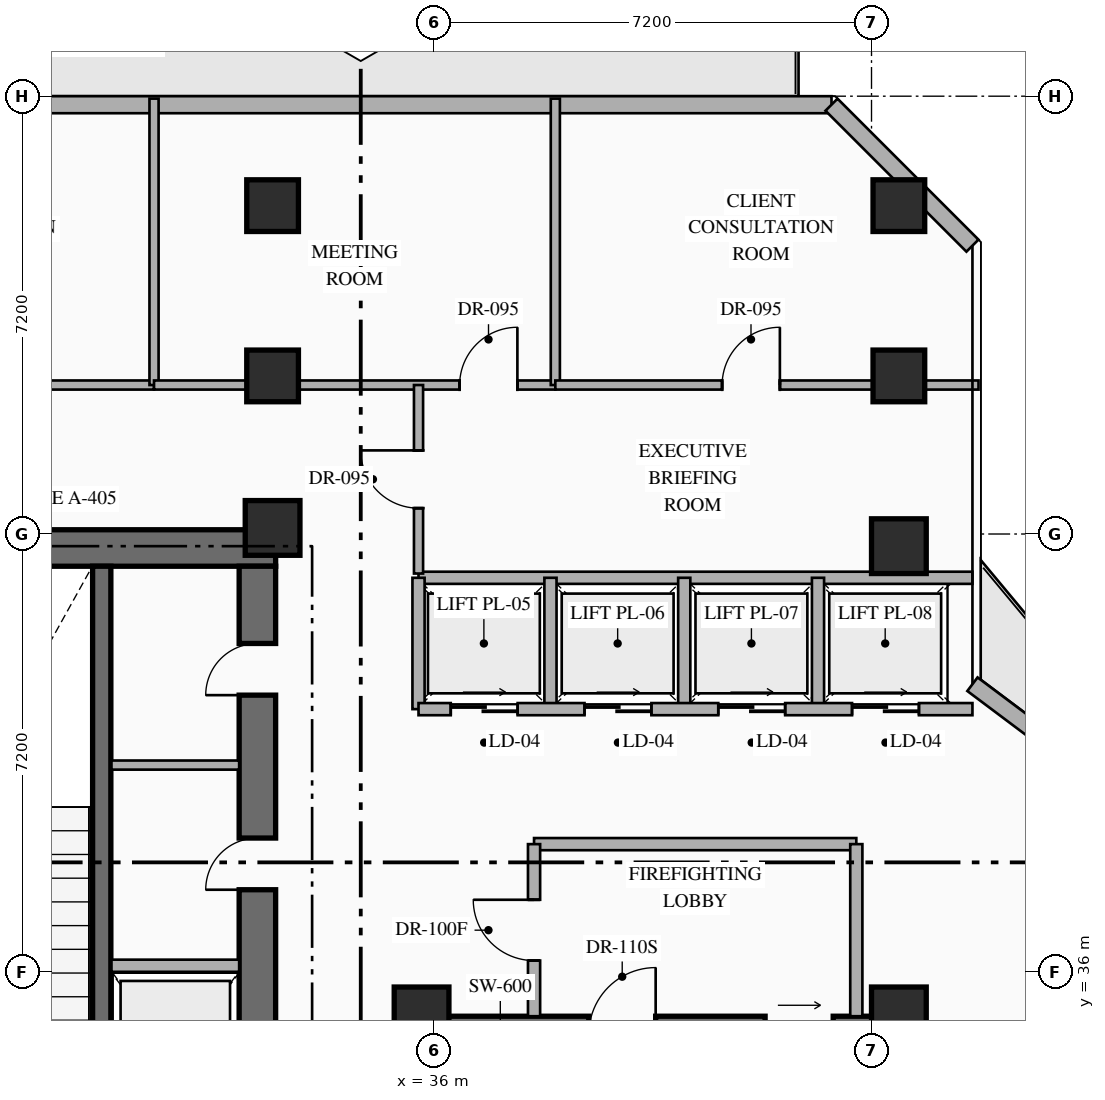
"""IFC4 building model, lengths in metres.
Left out: names, types, materials, properties, quantities, classifications, styles, units other than length and angle.
Written with IfcOpenShell. Run it as: python <this file> out.ifc"""

import sys

from ifc_helpers import new_model, si_unit, direction, frame, frame_2d, origin, origin_2d, place, context, subcontext, project, spatial, rectangle, hollow_rectangle, extrude, element, fill, save


model = new_model("IFC4")
c1 = context("Model", 3, precision=1e-05, world=origin(), true_north=direction((0.0, 1.0)))
c2 = subcontext(c1, "Body", "Model", "MODEL_VIEW")
j1 = project(units=[si_unit("LENGTHUNIT", "METRE"), si_unit("PLANEANGLEUNIT", "RADIAN")], contexts=[c1])
p1 = place(None, origin())
s1 = spatial("IfcSite", under=j1, at=p1, CompositionType="ELEMENT")
p2 = place(p1, origin())
s2 = spatial("IfcBuilding", under=s1, at=p2, CompositionType="ELEMENT")
p3 = place(p2, frame((0.0, 0.0, 145.65)))
s3 = spatial("IfcBuildingStorey", under=s2, at=p3, CompositionType="ELEMENT", Elevation=145.65)
p4 = place(p3, frame((25.62, 42.97, 0.0), z_axis=(0.0, 0.0, 1.0), x_axis=(1.0, 0.0, 0.0)))
e1 = element("IfcWall", 1, at=p4, inside=s3, PredefinedType="SHEAR", context=c2, shape_type="SweptSolid", body=[
    extrude(rectangle(XDim=7.78, YDim=0.6, at=frame_2d((3.89, 0.0))), origin(), (0.0, 0.0, 1.0), 3.6),
])
p5 = place(p3, frame((33.1, 33.19, 0.0), z_axis=(0.0, 0.0, 1.0), x_axis=(0.0, 1.0, 0.0)))
e2 = element("IfcWall", 2, at=p5, inside=s3, PredefinedType="SHEAR", context=c2, shape_type="SweptSolid", body=[
    extrude(rectangle(XDim=9.48, YDim=0.6, at=frame_2d((4.74, 0.0))), origin(), (0.0, 0.0, 1.0), 3.6),
])
p6 = place(p5, frame((4.16, 0.0, 0.0)))
e3 = element("IfcOpeningElement", 3, at=p6, cuts=e2, PredefinedType="OPENING", context=c2, shape_type="SweptSolid", body=[
    extrude(rectangle(XDim=0.85, YDim=2.08, at=frame_2d((0.425, 1.04))), frame((0.0, 0.31, 0.0), z_axis=(0.0, -1.0, 0.0), x_axis=(1.0, 0.0, 0.0)), (0.0, 0.0, 1.0), 0.62),
])
p7 = place(p5, frame((7.36, 0.0, 0.0)))
e4 = element("IfcOpeningElement", 4, at=p7, cuts=e2, PredefinedType="OPENING", context=c2, shape_type="SweptSolid", body=[
    extrude(rectangle(XDim=0.85, YDim=2.08, at=frame_2d((0.425, 1.04))), frame((0.0, 0.31, 0.0), z_axis=(0.0, -1.0, 0.0), x_axis=(1.0, 0.0, 0.0)), (0.0, 0.0, 1.0), 0.62),
])
p8 = place(p3, frame((30.54, 33.19, 0.0), z_axis=(0.0, 0.0, 1.0), x_axis=(0.0, 1.0, 0.0)))
e5 = element("IfcWall", 5, at=p8, inside=s3, PredefinedType="SHEAR", context=c2, shape_type="SweptSolid", body=[
    extrude(rectangle(XDim=9.48, YDim=0.3, at=frame_2d((4.74, 0.0))), origin(), (0.0, 0.0, 1.0), 3.6),
])
p9 = place(p3, frame((35.89, 34.97, 0.0), z_axis=(0.0, 0.0, 1.0), x_axis=(1.0, 0.0, 0.0)))
e6 = element("IfcWall", 6, at=p9, inside=s3, PredefinedType="SHEAR", context=c2, shape_type="SweptSolid", body=[
    extrude(rectangle(XDim=7.76, YDim=0.6, at=frame_2d((3.88, 0.0))), origin(), (0.0, 0.0, 1.0), 3.6),
])
p10 = place(p9, frame((2.66, 0.0, 0.0)))
e7 = element("IfcOpeningElement", 7, at=p10, cuts=e6, PredefinedType="OPENING", context=c2, shape_type="SweptSolid", body=[
    extrude(rectangle(XDim=1.1, YDim=2.2, at=frame_2d((0.55, 1.1))), frame((0.0, 0.31, 0.0), z_axis=(0.0, -1.0, 0.0), x_axis=(1.0, 0.0, 0.0)), (0.0, 0.0, 1.0), 0.62),
])
p11 = place(p9, frame((5.56, 0.0, 0.0)))
e8 = element("IfcOpeningElement", 8, at=p11, cuts=e6, PredefinedType="OPENING", context=c2, shape_type="SweptSolid", body=[
    extrude(rectangle(XDim=1.12, YDim=2.15, at=frame_2d((0.56, 1.075))), frame((0.0, 0.31, 0.0), z_axis=(0.0, -1.0, 0.0), x_axis=(1.0, 0.0, 0.0)), (0.0, 0.0, 1.0), 0.62),
])
for number, where, z_axis, x_axis in (
    (9, (33.35, 43.3, 0.0), (0.0, 0.0, 1.0), (1.0, 0.0, 0.0)),
    (10, (35.8, 35.3, 0.0), (0.0, 0.0, 1.0), (1.0, 0.0, 0.0)),
    (11, (43.65, 35.3, 0.0), (0.0, 0.0, 1.0), (1.0, 0.0, 0.0)),
    (12, (43.65, 43.0, 0.0), (0.0, 0.0, 1.0), (1.0, 0.0, 0.0)),
):
    element("IfcColumn", number, at=place(p3, frame(where, z_axis=z_axis, x_axis=x_axis)), inside=s3, PredefinedType="COLUMN", context=c2, shape_type="SweptSolid", body=[
        extrude(rectangle(XDim=0.9, YDim=0.9, at=origin_2d()), origin(), (0.0, 0.0, 1.0), 3.6),
    ])
for number, where, z_axis, x_axis in (
    (13, (33.35, 45.8, 0.0), (0.0, 0.0, 1.0), (1.0, 0.0, 0.0)),
    (14, (43.65, 45.8, 0.0), (0.0, 0.0, 1.0), (1.0, 0.0, 0.0)),
    (15, (33.35, 48.6, 0.0), (0.0, 0.0, 1.0), (1.0, 0.0, 0.0)),
    (16, (43.65, 48.6, 0.0), (0.0, 0.0, 1.0), (1.0, 0.0, 0.0)),
):
    element("IfcColumn", number, at=place(p3, frame(where, z_axis=z_axis, x_axis=x_axis)), inside=s3, PredefinedType="COLUMN", context=c2, shape_type="SweptSolid", body=[
        extrude(hollow_rectangle(XDim=0.85, YDim=0.85, WallThickness=0.032, at=origin_2d()), origin(), (0.0, 0.0, 1.0), 3.6),
    ])
p12 = place(p3, frame((44.86, 40.73, 0.0), z_axis=(0.0, 0.0, 1.0), x_axis=(0.800007624502, -0.599989833863, 0.0)))
e17 = element("IfcWall", 17, at=p12, inside=s3, PredefinedType="STANDARD", context=c2, shape_type="SweptSolid", body=[
    extrude(rectangle(XDim=19.212, YDim=0.28, at=frame_2d((9.606, 0.0))), origin(), (0.0, 0.0, 1.0), 3.35),
])
p13 = place(p12, frame((1.755, 0.0, 0.0)))
e18 = element("IfcOpeningElement", 18, at=p13, cuts=e17, PredefinedType="OPENING", context=c2, shape_type="SweptSolid", body=[
    extrude(rectangle(XDim=1.1, YDim=2.2, at=frame_2d((0.55, 1.1))), frame((0.0, 0.15, 0.0), z_axis=(0.0, -1.0, 0.0), x_axis=(1.0, 0.0, 0.0)), (0.0, 0.0, 1.0), 0.3),
])
p14 = place(p12, frame((13.509, 0.0, 0.85)))
e19 = element("IfcOpeningElement", 19, at=p14, cuts=e17, PredefinedType="OPENING", context=c2, shape_type="SweptSolid", body=[
    extrude(rectangle(XDim=1.8, YDim=2.1, at=frame_2d((0.9, 1.05))), frame((0.0, 0.15, 0.0), z_axis=(0.0, -1.0, 0.0), x_axis=(1.0, 0.0, 0.0)), (0.0, 0.0, 1.0), 0.3),
])
p15 = place(p3, frame((12.058, 50.26, 0.0), z_axis=(0.0, 0.0, 1.0), x_axis=(1.0, 0.0, 0.0)))
e20 = element("IfcWall", 20, at=p15, inside=s3, PredefinedType="STANDARD", context=c2, shape_type="SweptSolid", body=[
    extrude(rectangle(XDim=30.484, YDim=0.28, at=frame_2d((15.242, 0.0))), origin(), (0.0, 0.0, 1.0), 3.35),
])
p16 = place(p15, frame((14.992, 0.0, 0.0)))
e21 = element("IfcOpeningElement", 21, at=p16, cuts=e20, PredefinedType="OPENING", context=c2, shape_type="SweptSolid", body=[
    extrude(rectangle(XDim=1.1, YDim=2.2, at=frame_2d((0.55, 1.1))), frame((0.0, 0.15, 0.0), z_axis=(0.0, -1.0, 0.0), x_axis=(1.0, 0.0, 0.0)), (0.0, 0.0, 1.0), 0.3),
])
p17 = place(p15, frame((10.074, 0.0, 0.85)))
e22 = element("IfcOpeningElement", 22, at=p17, cuts=e20, PredefinedType="OPENING", context=c2, shape_type="SweptSolid", body=[
    extrude(rectangle(XDim=1.8, YDim=2.1, at=frame_2d((0.9, 1.05))), frame((0.0, 0.15, 0.0), z_axis=(0.0, -1.0, 0.0), x_axis=(1.0, 0.0, 0.0)), (0.0, 0.0, 1.0), 0.3),
])
p18 = place(p3, frame((42.542, 50.26, 0.0), z_axis=(0.0, 0.0, 1.0), x_axis=(0.707106781187, -0.707106781187, 0.0)))
e23 = element("IfcWall", 23, at=p18, inside=s3, PredefinedType="STANDARD", context=c2, shape_type="SweptSolid", body=[
    extrude(rectangle(XDim=3.278, YDim=0.28, at=frame_2d((1.639, 0.0))), origin(), (0.0, 0.0, 1.0), 3.35),
])
p19 = place(p3, frame((30.7, 36.1, 0.0), z_axis=(0.0, 0.0, 1.0), x_axis=(1.0, 0.0, 0.0)))
e24 = element("IfcWall", 24, at=p19, inside=s3, PredefinedType="STANDARD", context=c2, shape_type="SweptSolid", body=[
    extrude(rectangle(XDim=2.1, YDim=0.2, at=frame_2d((1.05, 0.0))), origin(), (0.0, 0.0, 1.0), 3.35),
])
p20 = place(p3, frame((30.7, 39.4, 0.0), z_axis=(0.0, 0.0, 1.0), x_axis=(1.0, 0.0, 0.0)))
e25 = element("IfcWall", 25, at=p20, inside=s3, PredefinedType="PARTITIONING", context=c2, shape_type="SweptSolid", body=[
    extrude(rectangle(XDim=2.1, YDim=0.15, at=frame_2d((1.05, 0.0))), origin(), (0.0, 0.0, 1.0), 3.35),
])
p21 = place(p3, frame((37.65, 38.1, 0.0), z_axis=(0.0, 0.0, 1.0), x_axis=(1.0, 0.0, 0.0)))
e26 = element("IfcWall", 26, at=p21, inside=s3, PredefinedType="STANDARD", context=c2, shape_type="SweptSolid", body=[
    extrude(rectangle(XDim=5.3, YDim=0.2, at=frame_2d((2.65, 0.0))), origin(), (0.0, 0.0, 1.0), 3.35),
])
p22 = place(p3, frame((42.95, 35.27, 0.0), z_axis=(0.0, 0.0, 1.0), x_axis=(0.0, 1.0, 0.0)))
e27 = element("IfcWall", 27, at=p22, inside=s3, PredefinedType="STANDARD", context=c2, shape_type="SweptSolid", body=[
    extrude(rectangle(XDim=2.83, YDim=0.2, at=frame_2d((1.415, 0.0))), origin(), (0.0, 0.0, 1.0), 3.35),
])
p23 = place(p3, frame((37.65, 35.27, 0.0), z_axis=(0.0, 0.0, 1.0), x_axis=(0.0, 1.0, 0.0)))
e28 = element("IfcWall", 28, at=p23, inside=s3, PredefinedType="STANDARD", context=c2, shape_type="SweptSolid", body=[
    extrude(rectangle(XDim=2.83, YDim=0.2, at=frame_2d((1.415, 0.0))), origin(), (0.0, 0.0, 1.0), 3.35),
])
p24 = place(p23, frame((0.915, 0.0, 0.0)))
e29 = element("IfcOpeningElement", 29, at=p24, cuts=e28, PredefinedType="OPENING", context=c2, shape_type="SweptSolid", body=[
    extrude(rectangle(XDim=1.0, YDim=2.2, at=frame_2d((0.5, 1.1))), frame((0.0, 0.11, 0.0), z_axis=(0.0, -1.0, 0.0), x_axis=(1.0, 0.0, 0.0)), (0.0, 0.0, 1.0), 0.22),
])
p25 = place(p3, frame((35.75, 42.48, 0.0), z_axis=(0.0, 0.0, 1.0), x_axis=(1.0, 0.0, 0.0)))
e30 = element("IfcWall", 30, at=p25, inside=s3, PredefinedType="STANDARD", context=c2, shape_type="SweptSolid", body=[
    extrude(rectangle(XDim=9.11, YDim=0.2, at=frame_2d((4.555, 0.0))), origin(), (0.0, 0.0, 1.0), 3.35),
])
for number, where, z_axis, x_axis in (
    (31, (35.75, 40.32, 0.0), (0.0, 0.0, 1.0), (0.0, 1.0, 0.0)),
    (32, (37.92, 40.32, 0.0), (0.0, 0.0, 1.0), (0.0, 1.0, 0.0)),
    (33, (40.12, 40.32, 0.0), (0.0, 0.0, 1.0), (0.0, 1.0, 0.0)),
    (34, (42.32, 40.32, 0.0), (0.0, 0.0, 1.0), (0.0, 1.0, 0.0)),
):
    element("IfcWall", number, at=place(p3, frame(where, z_axis=z_axis, x_axis=x_axis)), inside=s3, PredefinedType="STANDARD", context=c2, shape_type="SweptSolid", body=[
        extrude(rectangle(XDim=2.16, YDim=0.2, at=frame_2d((1.08, 0.0))), origin(), (0.0, 0.0, 1.0), 3.35),
    ])
p26 = place(p3, frame((35.75, 40.32, 0.0), z_axis=(0.0, 0.0, 1.0), x_axis=(1.0, 0.0, 0.0)))
e35 = element("IfcWall", 35, at=p26, inside=s3, PredefinedType="STANDARD", context=c2, shape_type="SweptSolid", body=[
    extrude(rectangle(XDim=9.11, YDim=0.2, at=frame_2d((4.555, 0.0))), origin(), (0.0, 0.0, 1.0), 3.35),
])
p27 = place(p26, frame((0.53, 0.0, 0.0)))
e36 = element("IfcOpeningElement", 36, at=p27, cuts=e35, PredefinedType="OPENING", context=c2, shape_type="SweptSolid", body=[
    extrude(rectangle(XDim=1.1, YDim=2.18, at=frame_2d((0.55, 1.09))), frame((0.0, 0.11, 0.0), z_axis=(0.0, -1.0, 0.0), x_axis=(1.0, 0.0, 0.0)), (0.0, 0.0, 1.0), 0.22),
])
p28 = place(p26, frame((2.73, 0.0, 0.0)))
e37 = element("IfcOpeningElement", 37, at=p28, cuts=e35, PredefinedType="OPENING", context=c2, shape_type="SweptSolid", body=[
    extrude(rectangle(XDim=1.1, YDim=2.18, at=frame_2d((0.55, 1.09))), frame((0.0, 0.11, 0.0), z_axis=(0.0, -1.0, 0.0), x_axis=(1.0, 0.0, 0.0)), (0.0, 0.0, 1.0), 0.22),
])
p29 = place(p26, frame((4.93, 0.0, 0.0)))
e38 = element("IfcOpeningElement", 38, at=p29, cuts=e35, PredefinedType="OPENING", context=c2, shape_type="SweptSolid", body=[
    extrude(rectangle(XDim=1.1, YDim=2.18, at=frame_2d((0.55, 1.09))), frame((0.0, 0.11, 0.0), z_axis=(0.0, -1.0, 0.0), x_axis=(1.0, 0.0, 0.0)), (0.0, 0.0, 1.0), 0.22),
])
p30 = place(p26, frame((7.13, 0.0, 0.0)))
e39 = element("IfcOpeningElement", 39, at=p30, cuts=e35, PredefinedType="OPENING", context=c2, shape_type="SweptSolid", body=[
    extrude(rectangle(XDim=1.1, YDim=2.18, at=frame_2d((0.55, 1.09))), frame((0.0, 0.11, 0.0), z_axis=(0.0, -1.0, 0.0), x_axis=(1.0, 0.0, 0.0)), (0.0, 0.0, 1.0), 0.22),
])
p31 = place(p3, frame((25.8, 45.65, 0.0), z_axis=(0.0, 0.0, 1.0), x_axis=(1.0, 0.0, 0.0)))
e40 = element("IfcWall", 40, at=p31, inside=s3, PredefinedType="PARTITIONING", context=c2, shape_type="SweptSolid", body=[
    extrude(rectangle(XDim=5.6, YDim=0.15, at=frame_2d((2.8, 0.0))), origin(), (0.0, 0.0, 1.0), 2.695),
])
p32 = place(p31, frame((2.325, 0.0, 0.0)))
e41 = element("IfcOpeningElement", 41, at=p32, cuts=e40, PredefinedType="OPENING", context=c2, shape_type="SweptSolid", body=[
    extrude(rectangle(XDim=0.95, YDim=2.15, at=frame_2d((0.475, 1.075))), frame((0.0, 0.085, 0.0), z_axis=(0.0, -1.0, 0.0), x_axis=(1.0, 0.0, 0.0)), (0.0, 0.0, 1.0), 0.17),
])
p33 = place(p3, frame((31.4, 45.65, 0.0), z_axis=(0.0, 0.0, 1.0), x_axis=(0.0, 1.0, 0.0)))
e42 = element("IfcWall", 42, at=p33, inside=s3, PredefinedType="PARTITIONING", context=c2, shape_type="SweptSolid", body=[
    extrude(rectangle(XDim=4.71, YDim=0.15, at=frame_2d((2.355, 0.0))), origin(), (0.0, 0.0, 1.0), 3.35),
])
p34 = place(p3, frame((31.4, 45.65, 0.0), z_axis=(0.0, 0.0, 1.0), x_axis=(1.0, 0.0, 0.0)))
e43 = element("IfcWall", 43, at=p34, inside=s3, PredefinedType="PARTITIONING", context=c2, shape_type="SweptSolid", body=[
    extrude(rectangle(XDim=6.6, YDim=0.15, at=frame_2d((3.3, 0.0))), origin(), (0.0, 0.0, 1.0), 2.695),
])
p35 = place(p34, frame((5.026, 0.0, 0.0)))
e44 = element("IfcOpeningElement", 44, at=p35, cuts=e43, PredefinedType="OPENING", context=c2, shape_type="SweptSolid", body=[
    extrude(rectangle(XDim=0.95, YDim=2.15, at=frame_2d((0.475, 1.075))), frame((0.0, 0.085, 0.0), z_axis=(0.0, -1.0, 0.0), x_axis=(1.0, 0.0, 0.0)), (0.0, 0.0, 1.0), 0.17),
])
p36 = place(p3, frame((38.0, 45.65, 0.0), z_axis=(0.0, 0.0, 1.0), x_axis=(0.0, 1.0, 0.0)))
e45 = element("IfcWall", 45, at=p36, inside=s3, PredefinedType="PARTITIONING", context=c2, shape_type="SweptSolid", body=[
    extrude(rectangle(XDim=4.71, YDim=0.15, at=frame_2d((2.355, 0.0))), origin(), (0.0, 0.0, 1.0), 3.35),
])
p37 = place(p3, frame((38.0, 45.65, 0.0), z_axis=(0.0, 0.0, 1.0), x_axis=(1.0, 0.0, 0.0)))
e46 = element("IfcWall", 46, at=p37, inside=s3, PredefinedType="PARTITIONING", context=c2, shape_type="SweptSolid", body=[
    extrude(rectangle(XDim=6.96, YDim=0.15, at=frame_2d((3.48, 0.0))), origin(), (0.0, 0.0, 1.0), 2.695),
])
p38 = place(p37, frame((2.743, 0.0, 0.0)))
e47 = element("IfcOpeningElement", 47, at=p38, cuts=e46, PredefinedType="OPENING", context=c2, shape_type="SweptSolid", body=[
    extrude(rectangle(XDim=0.95, YDim=2.15, at=frame_2d((0.475, 1.075))), frame((0.0, 0.085, 0.0), z_axis=(0.0, -1.0, 0.0), x_axis=(1.0, 0.0, 0.0)), (0.0, 0.0, 1.0), 0.17),
])
p39 = place(p3, frame((43.63, 31.973, 0.0), z_axis=(0.0, 0.0, 1.0), x_axis=(0.599975099311, 0.800018674911, 0.0)))
e48 = element("IfcWall", 48, at=p39, inside=s3, PredefinedType="PARTITIONING", context=c2, shape_type="SweptSolid", body=[
    extrude(rectangle(XDim=7.844, YDim=0.15, at=frame_2d((3.922, 0.0))), origin(), (0.0, 0.0, 1.0), 3.35),
])
p40 = place(p3, frame((35.75, 42.55, 0.0), z_axis=(0.0, 0.0, 1.0), x_axis=(0.0, 1.0, 0.0)))
e49 = element("IfcWall", 49, at=p40, inside=s3, PredefinedType="PARTITIONING", context=c2, shape_type="SweptSolid", body=[
    extrude(rectangle(XDim=3.1, YDim=0.15, at=frame_2d((1.55, 0.0))), origin(), (0.0, 0.0, 1.0), 3.35),
])
p41 = place(p40, frame((1.075, 0.0, 0.0)))
e50 = element("IfcOpeningElement", 50, at=p41, cuts=e49, PredefinedType="OPENING", context=c2, shape_type="SweptSolid", body=[
    extrude(rectangle(XDim=0.95, YDim=2.15, at=frame_2d((0.475, 1.075))), frame((0.0, 0.085, 0.0), z_axis=(0.0, -1.0, 0.0), x_axis=(1.0, 0.0, 0.0)), (0.0, 0.0, 1.0), 0.17),
])
p42 = place(p6, origin())
e51 = element("IfcDoor", 51, at=p42, inside=s3, OperationType="SINGLE_SWING_LEFT", PredefinedType="DOOR", context=c2, shape_type="SweptSolid", body=[
    extrude(rectangle(XDim=0.85, YDim=2.08, at=frame_2d((0.425, 1.04))), frame((0.0, 0.025, 0.0), z_axis=(0.0, -1.0, 0.0), x_axis=(1.0, 0.0, 0.0)), (0.0, 0.0, 1.0), 0.05),
])
fill(e3, e51)
p43 = place(p7, origin())
e52 = element("IfcDoor", 52, at=p43, inside=s3, OperationType="SINGLE_SWING_LEFT", PredefinedType="DOOR", context=c2, shape_type="SweptSolid", body=[
    extrude(rectangle(XDim=0.85, YDim=2.08, at=frame_2d((0.425, 1.04))), frame((0.0, 0.025, 0.0), z_axis=(0.0, -1.0, 0.0), x_axis=(1.0, 0.0, 0.0)), (0.0, 0.0, 1.0), 0.05),
])
fill(e4, e52)
p44 = place(p24, origin())
e53 = element("IfcDoor", 53, at=p44, inside=s3, OperationType="SINGLE_SWING_RIGHT", PredefinedType="DOOR", context=c2, shape_type="SweptSolid", body=[
    extrude(rectangle(XDim=1.0, YDim=2.2, at=frame_2d((0.5, 1.1))), frame((0.0, 0.025, 0.0), z_axis=(0.0, -1.0, 0.0), x_axis=(1.0, 0.0, 0.0)), (0.0, 0.0, 1.0), 0.05),
])
fill(e29, e53)
p45 = place(p27, origin())
e54 = element("IfcDoor", 54, at=p45, inside=s3, OperationType="SLIDING_TO_RIGHT", PredefinedType="USERDEFINED", context=c2, shape_type="SweptSolid", body=[
    extrude(rectangle(XDim=1.1, YDim=2.18, at=frame_2d((0.55, 1.09))), frame((0.0, 0.025, 0.0), z_axis=(0.0, -1.0, 0.0), x_axis=(1.0, 0.0, 0.0)), (0.0, 0.0, 1.0), 0.05),
])
fill(e36, e54)
p46 = place(p28, origin())
e55 = element("IfcDoor", 55, at=p46, inside=s3, OperationType="SLIDING_TO_RIGHT", PredefinedType="USERDEFINED", context=c2, shape_type="SweptSolid", body=[
    extrude(rectangle(XDim=1.1, YDim=2.18, at=frame_2d((0.55, 1.09))), frame((0.0, 0.025, 0.0), z_axis=(0.0, -1.0, 0.0), x_axis=(1.0, 0.0, 0.0)), (0.0, 0.0, 1.0), 0.05),
])
fill(e37, e55)
p47 = place(p29, origin())
e56 = element("IfcDoor", 56, at=p47, inside=s3, OperationType="SLIDING_TO_RIGHT", PredefinedType="USERDEFINED", context=c2, shape_type="SweptSolid", body=[
    extrude(rectangle(XDim=1.1, YDim=2.18, at=frame_2d((0.55, 1.09))), frame((0.0, 0.025, 0.0), z_axis=(0.0, -1.0, 0.0), x_axis=(1.0, 0.0, 0.0)), (0.0, 0.0, 1.0), 0.05),
])
fill(e38, e56)
p48 = place(p30, origin())
e57 = element("IfcDoor", 57, at=p48, inside=s3, OperationType="SLIDING_TO_RIGHT", PredefinedType="USERDEFINED", context=c2, shape_type="SweptSolid", body=[
    extrude(rectangle(XDim=1.1, YDim=2.18, at=frame_2d((0.55, 1.09))), frame((0.0, 0.025, 0.0), z_axis=(0.0, -1.0, 0.0), x_axis=(1.0, 0.0, 0.0)), (0.0, 0.0, 1.0), 0.05),
])
fill(e39, e57)
p49 = place(p35, origin())
e58 = element("IfcDoor", 58, at=p49, inside=s3, OperationType="SINGLE_SWING_RIGHT", PredefinedType="DOOR", context=c2, shape_type="SweptSolid", body=[
    extrude(rectangle(XDim=0.95, YDim=2.15, at=frame_2d((0.475, 1.075))), frame((0.0, 0.025, 0.0), z_axis=(0.0, -1.0, 0.0), x_axis=(1.0, 0.0, 0.0)), (0.0, 0.0, 1.0), 0.05),
])
fill(e44, e58)
p50 = place(p38, origin())
e59 = element("IfcDoor", 59, at=p50, inside=s3, OperationType="SINGLE_SWING_RIGHT", PredefinedType="DOOR", context=c2, shape_type="SweptSolid", body=[
    extrude(rectangle(XDim=0.95, YDim=2.15, at=frame_2d((0.475, 1.075))), frame((0.0, 0.025, 0.0), z_axis=(0.0, -1.0, 0.0), x_axis=(1.0, 0.0, 0.0)), (0.0, 0.0, 1.0), 0.05),
])
fill(e47, e59)
p51 = place(p41, origin())
e60 = element("IfcDoor", 60, at=p51, inside=s3, OperationType="SINGLE_SWING_RIGHT", PredefinedType="DOOR", context=c2, shape_type="SweptSolid", body=[
    extrude(rectangle(XDim=0.95, YDim=2.15, at=frame_2d((0.475, 1.075))), frame((0.0, 0.025, 0.0), z_axis=(0.0, -1.0, 0.0), x_axis=(1.0, 0.0, 0.0)), (0.0, 0.0, 1.0), 0.05),
])
fill(e50, e60)
save(model, sys.argv[1])
